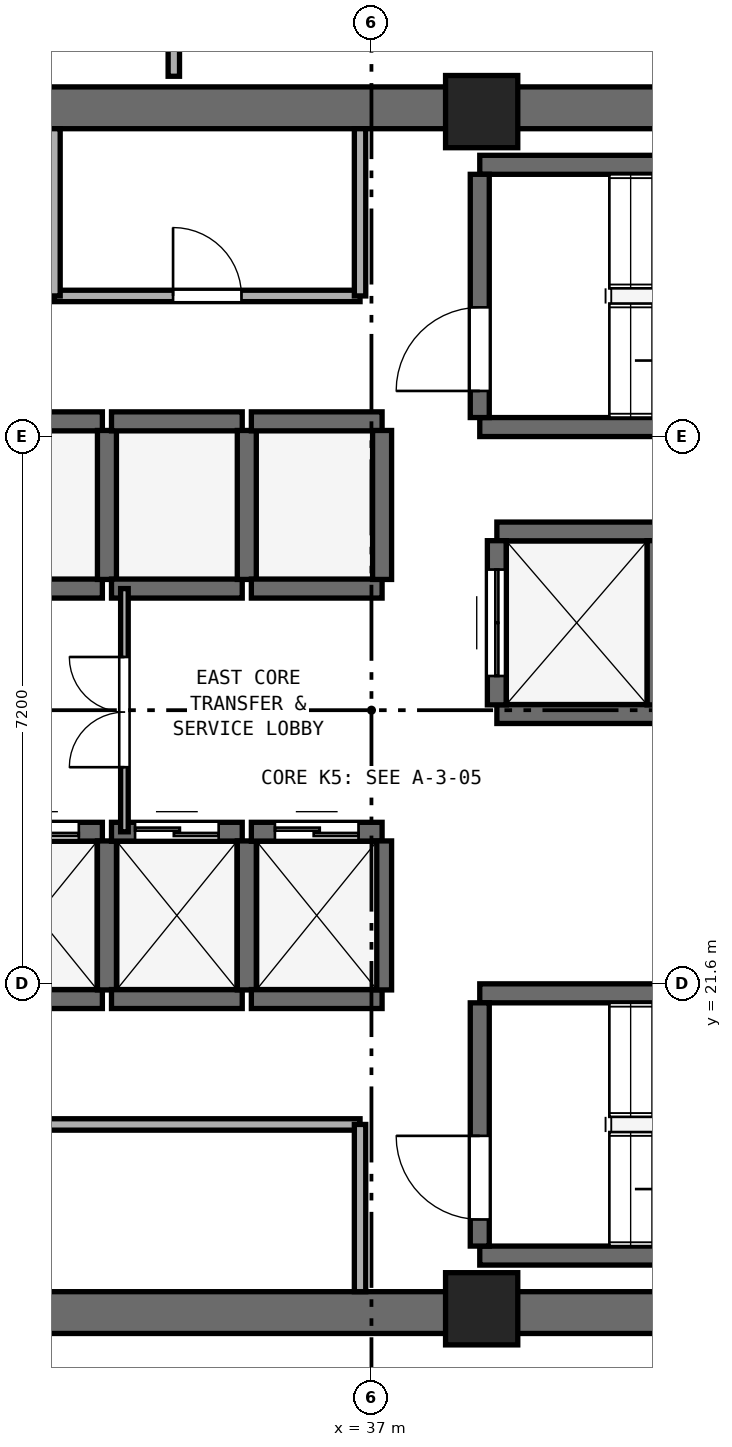
"""IFC4 building model, lengths in metres.
Left out: names, types, materials, properties, quantities, classifications, styles, units other than length and angle.
Written with IfcOpenShell. Run it as: python <this file> out.ifc"""

import sys

from ifc_helpers import new_model, si_unit, direction, frame, frame_2d, origin, origin_2d, place, context, subcontext, project, spatial, rectangle, extrude, element, fill, save


model = new_model("IFC4")
c1 = context("Model", 3, precision=1e-05, world=origin(), true_north=direction((0.0, 1.0)))
c2 = subcontext(c1, "Body", "Model", "MODEL_VIEW")
j1 = project(units=[si_unit("LENGTHUNIT", "METRE"), si_unit("PLANEANGLEUNIT", "RADIAN")], contexts=[c1])
p1 = place(None, origin())
s1 = spatial("IfcSite", under=j1, at=p1, CompositionType="ELEMENT")
p2 = place(p1, origin())
s2 = spatial("IfcBuilding", under=s1, at=p2, CompositionType="ELEMENT")
p3 = place(p2, frame((0.0, 0.0, 174.4)))
s3 = spatial("IfcBuildingStorey", under=s2, at=p3, CompositionType="ELEMENT", Elevation=174.4)
for number, where, z_axis, x_axis in (
    (1, (25.4, 17.275, 0.0), (0.0, 0.0, 1.0), (1.0, 0.0, 0.0)),
    (2, (25.4, 33.125, 0.0), (0.0, 0.0, 1.0), (1.0, 0.0, 0.0)),
):
    element("IfcWall", number, at=place(p3, frame(where, z_axis=z_axis, x_axis=x_axis)), inside=s3, PredefinedType="SHEAR", context=c2, shape_type="SweptSolid", body=[
        extrude(rectangle(XDim=23.2, YDim=0.55, at=frame_2d((11.6, 0.0))), origin(), (0.0, 0.0, 1.0), 3.54),
    ])
for number, where, z_axis, x_axis in (
    (3, (38.45, 17.325, 0.0), (0.0, 0.0, 1.0), (1.0, 0.0, 0.0)),
    (4, (38.45, 33.075, 0.0), (0.0, 0.0, 1.0), (1.0, 0.0, 0.0)),
):
    element("IfcColumn", number, at=place(p3, frame(where, z_axis=z_axis, x_axis=x_axis)), inside=s3, PredefinedType="PILASTER", context=c2, shape_type="SweptSolid", body=[
        extrude(rectangle(XDim=0.95, YDim=0.95, at=origin_2d()), origin(), (0.0, 0.0, 1.0), 3.8),
    ])
for number, where, z_axis, x_axis in (
    (5, (38.425, 28.925, 0.0), (0.0, 0.0, 1.0), (1.0, 0.0, 0.0)),
    (6, (38.425, 32.375, 0.0), (0.0, 0.0, 1.0), (1.0, 0.0, 0.0)),
):
    element("IfcWall", number, at=place(p3, frame(where, z_axis=z_axis, x_axis=x_axis)), inside=s3, PredefinedType="SHEAR", context=c2, shape_type="SweptSolid", body=[
        extrude(rectangle(XDim=7.3, YDim=0.25, at=frame_2d((3.65, 0.0))), origin(), (0.0, 0.0, 1.0), 3.54),
    ])
p4 = place(p3, frame((38.425, 29.05, 0.0), z_axis=(0.0, 0.0, 1.0), x_axis=(0.0, 1.0, 0.0)))
e7 = element("IfcWall", 7, at=p4, inside=s3, PredefinedType="SHEAR", context=c2, shape_type="SweptSolid", body=[
    extrude(rectangle(XDim=3.2, YDim=0.25, at=frame_2d((1.6, 0.0))), origin(), (0.0, 0.0, 1.0), 3.54),
])
p5 = place(p4, frame((0.35, 0.0, 0.0)))
e8 = element("IfcOpeningElement", 8, at=p5, cuts=e7, PredefinedType="OPENING", context=c2, shape_type="SweptSolid", body=[
    extrude(rectangle(XDim=1.1, YDim=2.15, at=frame_2d((0.55, 1.075))), frame((0.0, 0.135, 0.0), z_axis=(0.0, -1.0, 0.0), x_axis=(1.0, 0.0, 0.0)), (0.0, 0.0, 1.0), 0.27),
])
for number, where, z_axis, x_axis in (
    (9, (38.425, 18.025, 0.0), (0.0, 0.0, 1.0), (1.0, 0.0, 0.0)),
    (10, (38.425, 21.475, 0.0), (0.0, 0.0, 1.0), (1.0, 0.0, 0.0)),
):
    element("IfcWall", number, at=place(p3, frame(where, z_axis=z_axis, x_axis=x_axis)), inside=s3, PredefinedType="SHEAR", context=c2, shape_type="SweptSolid", body=[
        extrude(rectangle(XDim=7.3, YDim=0.25, at=frame_2d((3.65, 0.0))), origin(), (0.0, 0.0, 1.0), 3.54),
    ])
p6 = place(p3, frame((38.425, 18.15, 0.0), z_axis=(0.0, 0.0, 1.0), x_axis=(0.0, 1.0, 0.0)))
e11 = element("IfcWall", 11, at=p6, inside=s3, PredefinedType="SHEAR", context=c2, shape_type="SweptSolid", body=[
    extrude(rectangle(XDim=3.2, YDim=0.25, at=frame_2d((1.6, 0.0))), origin(), (0.0, 0.0, 1.0), 3.54),
])
p7 = place(p6, frame((0.35, 0.0, 0.0)))
e12 = element("IfcOpeningElement", 12, at=p7, cuts=e11, PredefinedType="OPENING", context=c2, shape_type="SweptSolid", body=[
    extrude(rectangle(XDim=1.1, YDim=2.15, at=frame_2d((0.55, 1.075))), frame((0.0, 0.135, 0.0), z_axis=(0.0, -1.0, 0.0), x_axis=(1.0, 0.0, 0.0)), (0.0, 0.0, 1.0), 0.27),
])
p8 = place(p3, frame((31.74, 21.4, 0.0), z_axis=(0.0, 0.0, 1.0), x_axis=(1.0, 0.0, 0.0)))
e13 = element("IfcWall", 13, at=p8, inside=s3, PredefinedType="SHEAR", context=c2, shape_type="SweptSolid", body=[
    extrude(rectangle(XDim=1.72, YDim=0.25, at=frame_2d((0.86, 0.0))), origin(), (0.0, 0.0, 1.0), 3.54),
])
p9 = place(p3, frame((31.74, 23.6, 0.0), z_axis=(0.0, 0.0, 1.0), x_axis=(1.0, 0.0, 0.0)))
e14 = element("IfcWall", 14, at=p9, inside=s3, PredefinedType="SHEAR", context=c2, shape_type="SweptSolid", body=[
    extrude(rectangle(XDim=1.72, YDim=0.25, at=frame_2d((0.86, 0.0))), origin(), (0.0, 0.0, 1.0), 3.54),
])
p10 = place(p9, frame((0.31, 0.0, 0.0)))
e15 = element("IfcOpeningElement", 15, at=p10, cuts=e14, PredefinedType="OPENING", context=c2, shape_type="SweptSolid", body=[
    extrude(rectangle(XDim=1.1, YDim=2.15, at=frame_2d((0.55, 1.075))), frame((0.0, 0.135, 0.0), z_axis=(0.0, -1.0, 0.0), x_axis=(1.0, 0.0, 0.0)), (0.0, 0.0, 1.0), 0.27),
])
p11 = place(p3, frame((33.52, 21.52, 0.0), z_axis=(0.0, 0.0, 1.0), x_axis=(0.0, 1.0, 0.0)))
e16 = element("IfcWall", 16, at=p11, inside=s3, PredefinedType="SHEAR", context=c2, shape_type="SweptSolid", body=[
    extrude(rectangle(XDim=1.96, YDim=0.25, at=frame_2d((0.98, 0.0))), origin(), (0.0, 0.0, 1.0), 3.54),
])
p12 = place(p3, frame((33.58, 21.4, 0.0), z_axis=(0.0, 0.0, 1.0), x_axis=(1.0, 0.0, 0.0)))
e17 = element("IfcWall", 17, at=p12, inside=s3, PredefinedType="SHEAR", context=c2, shape_type="SweptSolid", body=[
    extrude(rectangle(XDim=1.72, YDim=0.25, at=frame_2d((0.86, 0.0))), origin(), (0.0, 0.0, 1.0), 3.54),
])
p13 = place(p3, frame((33.58, 23.6, 0.0), z_axis=(0.0, 0.0, 1.0), x_axis=(1.0, 0.0, 0.0)))
e18 = element("IfcWall", 18, at=p13, inside=s3, PredefinedType="SHEAR", context=c2, shape_type="SweptSolid", body=[
    extrude(rectangle(XDim=1.72, YDim=0.25, at=frame_2d((0.86, 0.0))), origin(), (0.0, 0.0, 1.0), 3.54),
])
p14 = place(p13, frame((0.31, 0.0, 0.0)))
e19 = element("IfcOpeningElement", 19, at=p14, cuts=e18, PredefinedType="OPENING", context=c2, shape_type="SweptSolid", body=[
    extrude(rectangle(XDim=1.1, YDim=2.15, at=frame_2d((0.55, 1.075))), frame((0.0, 0.135, 0.0), z_axis=(0.0, -1.0, 0.0), x_axis=(1.0, 0.0, 0.0)), (0.0, 0.0, 1.0), 0.27),
])
p15 = place(p3, frame((35.36, 21.52, 0.0), z_axis=(0.0, 0.0, 1.0), x_axis=(0.0, 1.0, 0.0)))
e20 = element("IfcWall", 20, at=p15, inside=s3, PredefinedType="SHEAR", context=c2, shape_type="SweptSolid", body=[
    extrude(rectangle(XDim=1.96, YDim=0.25, at=frame_2d((0.98, 0.0))), origin(), (0.0, 0.0, 1.0), 3.54),
])
p16 = place(p3, frame((35.42, 21.4, 0.0), z_axis=(0.0, 0.0, 1.0), x_axis=(1.0, 0.0, 0.0)))
e21 = element("IfcWall", 21, at=p16, inside=s3, PredefinedType="SHEAR", context=c2, shape_type="SweptSolid", body=[
    extrude(rectangle(XDim=1.72, YDim=0.25, at=frame_2d((0.86, 0.0))), origin(), (0.0, 0.0, 1.0), 3.54),
])
p17 = place(p3, frame((35.42, 23.6, 0.0), z_axis=(0.0, 0.0, 1.0), x_axis=(1.0, 0.0, 0.0)))
e22 = element("IfcWall", 22, at=p17, inside=s3, PredefinedType="SHEAR", context=c2, shape_type="SweptSolid", body=[
    extrude(rectangle(XDim=1.72, YDim=0.25, at=frame_2d((0.86, 0.0))), origin(), (0.0, 0.0, 1.0), 3.54),
])
p18 = place(p17, frame((0.31, 0.0, 0.0)))
e23 = element("IfcOpeningElement", 23, at=p18, cuts=e22, PredefinedType="OPENING", context=c2, shape_type="SweptSolid", body=[
    extrude(rectangle(XDim=1.1, YDim=2.15, at=frame_2d((0.55, 1.075))), frame((0.0, 0.135, 0.0), z_axis=(0.0, -1.0, 0.0), x_axis=(1.0, 0.0, 0.0)), (0.0, 0.0, 1.0), 0.27),
])
p19 = place(p3, frame((37.14, 21.52, 0.0), z_axis=(0.0, 0.0, 1.0), x_axis=(0.0, 1.0, 0.0)))
e24 = element("IfcWall", 24, at=p19, inside=s3, PredefinedType="SHEAR", context=c2, shape_type="SweptSolid", body=[
    extrude(rectangle(XDim=1.96, YDim=0.25, at=frame_2d((0.98, 0.0))), origin(), (0.0, 0.0, 1.0), 3.54),
])
for number, where, z_axis, x_axis in (
    (25, (31.74, 26.8, 0.0), (0.0, 0.0, 1.0), (1.0, 0.0, 0.0)),
    (26, (31.74, 29.0, 0.0), (0.0, 0.0, 1.0), (1.0, 0.0, 0.0)),
):
    element("IfcWall", number, at=place(p3, frame(where, z_axis=z_axis, x_axis=x_axis)), inside=s3, PredefinedType="SHEAR", context=c2, shape_type="SweptSolid", body=[
        extrude(rectangle(XDim=1.72, YDim=0.25, at=frame_2d((0.86, 0.0))), origin(), (0.0, 0.0, 1.0), 3.54),
    ])
p20 = place(p3, frame((33.52, 26.92, 0.0), z_axis=(0.0, 0.0, 1.0), x_axis=(0.0, 1.0, 0.0)))
e27 = element("IfcWall", 27, at=p20, inside=s3, PredefinedType="SHEAR", context=c2, shape_type="SweptSolid", body=[
    extrude(rectangle(XDim=1.96, YDim=0.25, at=frame_2d((0.98, 0.0))), origin(), (0.0, 0.0, 1.0), 3.54),
])
for number, where, z_axis, x_axis in (
    (28, (33.58, 26.8, 0.0), (0.0, 0.0, 1.0), (1.0, 0.0, 0.0)),
    (29, (33.58, 29.0, 0.0), (0.0, 0.0, 1.0), (1.0, 0.0, 0.0)),
):
    element("IfcWall", number, at=place(p3, frame(where, z_axis=z_axis, x_axis=x_axis)), inside=s3, PredefinedType="SHEAR", context=c2, shape_type="SweptSolid", body=[
        extrude(rectangle(XDim=1.72, YDim=0.25, at=frame_2d((0.86, 0.0))), origin(), (0.0, 0.0, 1.0), 3.54),
    ])
p21 = place(p3, frame((35.36, 26.92, 0.0), z_axis=(0.0, 0.0, 1.0), x_axis=(0.0, 1.0, 0.0)))
e30 = element("IfcWall", 30, at=p21, inside=s3, PredefinedType="SHEAR", context=c2, shape_type="SweptSolid", body=[
    extrude(rectangle(XDim=1.96, YDim=0.25, at=frame_2d((0.98, 0.0))), origin(), (0.0, 0.0, 1.0), 3.54),
])
for number, where, z_axis, x_axis in (
    (31, (35.42, 26.8, 0.0), (0.0, 0.0, 1.0), (1.0, 0.0, 0.0)),
    (32, (35.42, 29.0, 0.0), (0.0, 0.0, 1.0), (1.0, 0.0, 0.0)),
):
    element("IfcWall", number, at=place(p3, frame(where, z_axis=z_axis, x_axis=x_axis)), inside=s3, PredefinedType="SHEAR", context=c2, shape_type="SweptSolid", body=[
        extrude(rectangle(XDim=1.72, YDim=0.25, at=frame_2d((0.86, 0.0))), origin(), (0.0, 0.0, 1.0), 3.54),
    ])
p22 = place(p3, frame((37.14, 26.92, 0.0), z_axis=(0.0, 0.0, 1.0), x_axis=(0.0, 1.0, 0.0)))
e33 = element("IfcWall", 33, at=p22, inside=s3, PredefinedType="SHEAR", context=c2, shape_type="SweptSolid", body=[
    extrude(rectangle(XDim=1.96, YDim=0.25, at=frame_2d((0.98, 0.0))), origin(), (0.0, 0.0, 1.0), 3.54),
])
for number, where, z_axis, x_axis in (
    (34, (38.65, 25.15, 0.0), (0.0, 0.0, 1.0), (1.0, 0.0, 0.0)),
    (35, (38.65, 27.55, 0.0), (0.0, 0.0, 1.0), (1.0, 0.0, 0.0)),
):
    element("IfcWall", number, at=place(p3, frame(where, z_axis=z_axis, x_axis=x_axis)), inside=s3, PredefinedType="SHEAR", context=c2, shape_type="SweptSolid", body=[
        extrude(rectangle(XDim=2.1, YDim=0.25, at=frame_2d((1.05, 0.0))), origin(), (0.0, 0.0, 1.0), 3.54),
    ])
p23 = place(p3, frame((38.65, 25.27, 0.0), z_axis=(0.0, 0.0, 1.0), x_axis=(0.0, 1.0, 0.0)))
e36 = element("IfcWall", 36, at=p23, inside=s3, PredefinedType="SHEAR", context=c2, shape_type="SweptSolid", body=[
    extrude(rectangle(XDim=2.16, YDim=0.25, at=frame_2d((1.08, 0.0))), origin(), (0.0, 0.0, 1.0), 3.54),
])
p24 = place(p23, frame((0.38, 0.0, 0.0)))
e37 = element("IfcOpeningElement", 37, at=p24, cuts=e36, PredefinedType="OPENING", context=c2, shape_type="SweptSolid", body=[
    extrude(rectangle(XDim=1.4, YDim=2.2, at=frame_2d((0.7, 1.1))), frame((0.0, 0.135, 0.0), z_axis=(0.0, -1.0, 0.0), x_axis=(1.0, 0.0, 0.0)), (0.0, 0.0, 1.0), 0.27),
])
p25 = place(p3, frame((40.75, 25.27, 0.0), z_axis=(0.0, 0.0, 1.0), x_axis=(0.0, 1.0, 0.0)))
e38 = element("IfcWall", 38, at=p25, inside=s3, PredefinedType="SHEAR", context=c2, shape_type="SweptSolid", body=[
    extrude(rectangle(XDim=2.16, YDim=0.25, at=frame_2d((1.08, 0.0))), origin(), (0.0, 0.0, 1.0), 3.54),
])
p26 = place(p3, frame((32.83, 30.65, 0.0), z_axis=(0.0, 0.0, 1.0), x_axis=(1.0, 0.0, 0.0)))
e39 = element("IfcWall", 39, at=p26, inside=s3, PredefinedType="PARTITIONING", context=c2, shape_type="SweptSolid", body=[
    extrude(rectangle(XDim=4.02, YDim=0.15, at=frame_2d((2.01, 0.0))), origin(), (0.0, 0.0, 1.0), 3.54),
])
p27 = place(p26, frame((1.56, 0.0, 0.0)))
e40 = element("IfcOpeningElement", 40, at=p27, cuts=e39, PredefinedType="OPENING", context=c2, shape_type="SweptSolid", body=[
    extrude(rectangle(XDim=0.9, YDim=2.1, at=frame_2d((0.45, 1.05))), frame((0.0, 0.085, 0.0), z_axis=(0.0, -1.0, 0.0), x_axis=(1.0, 0.0, 0.0)), (0.0, 0.0, 1.0), 0.17),
])
for number, where, z_axis, x_axis in (
    (41, (32.83, 30.65, 0.0), (0.0, 0.0, 1.0), (0.0, 1.0, 0.0)),
    (42, (36.85, 30.65, 0.0), (0.0, 0.0, 1.0), (0.0, 1.0, 0.0)),
):
    element("IfcWall", number, at=place(p3, frame(where, z_axis=z_axis, x_axis=x_axis)), inside=s3, PredefinedType="PARTITIONING", context=c2, shape_type="SweptSolid", body=[
        extrude(rectangle(XDim=2.2, YDim=0.15, at=frame_2d((1.1, 0.0))), origin(), (0.0, 0.0, 1.0), 3.54),
    ])
p28 = place(p3, frame((26.07, 19.75, 0.0), z_axis=(0.0, 0.0, 1.0), x_axis=(1.0, 0.0, 0.0)))
e43 = element("IfcWall", 43, at=p28, inside=s3, PredefinedType="PARTITIONING", context=c2, shape_type="SweptSolid", body=[
    extrude(rectangle(XDim=10.78, YDim=0.15, at=frame_2d((5.39, 0.0))), origin(), (0.0, 0.0, 1.0), 3.54),
])
p29 = place(p28, frame((4.915, 0.0, 0.0)))
e44 = element("IfcOpeningElement", 44, at=p29, cuts=e43, PredefinedType="OPENING", context=c2, shape_type="SweptSolid", body=[
    extrude(rectangle(XDim=0.95, YDim=2.1, at=frame_2d((0.475, 1.05))), frame((0.0, 0.085, 0.0), z_axis=(0.0, -1.0, 0.0), x_axis=(1.0, 0.0, 0.0)), (0.0, 0.0, 1.0), 0.17),
])
p30 = place(p3, frame((36.85, 17.55, 0.0), z_axis=(0.0, 0.0, 1.0), x_axis=(0.0, 1.0, 0.0)))
e45 = element("IfcWall", 45, at=p30, inside=s3, PredefinedType="PARTITIONING", context=c2, shape_type="SweptSolid", body=[
    extrude(rectangle(XDim=2.2, YDim=0.15, at=frame_2d((1.1, 0.0))), origin(), (0.0, 0.0, 1.0), 3.54),
])
p31 = place(p3, frame((33.75, 23.6, 0.0), z_axis=(0.0, 0.0, 1.0), x_axis=(0.0, 1.0, 0.0)))
e46 = element("IfcWall", 46, at=p31, inside=s3, PredefinedType="PARTITIONING", context=c2, shape_type="SweptSolid", body=[
    extrude(rectangle(XDim=3.2, YDim=0.1, at=frame_2d((1.6, 0.0))), origin(), (0.0, 0.0, 1.0), 3.54),
])
p32 = place(p31, frame((0.85, 0.0, 0.0)))
e47 = element("IfcOpeningElement", 47, at=p32, cuts=e46, PredefinedType="OPENING", context=c2, shape_type="SweptSolid", body=[
    extrude(rectangle(XDim=1.45, YDim=2.12, at=frame_2d((0.725, 1.06))), frame((0.0, 0.06, 0.0), z_axis=(0.0, -1.0, 0.0), x_axis=(1.0, 0.0, 0.0)), (0.0, 0.0, 1.0), 0.12),
])
p33 = place(p3, frame((34.4, 33.54, 0.0), z_axis=(0.0, 0.0, 1.0), x_axis=(0.0, 1.0, 0.0)))
e48 = element("IfcWall", 48, at=p33, inside=s3, PredefinedType="PARTITIONING", context=c2, shape_type="SweptSolid", body=[
    extrude(rectangle(XDim=2.41, YDim=0.15, at=frame_2d((1.205, 0.0))), origin(), (0.0, 0.0, 1.0), 3.54),
])
p34 = place(p5, origin())
e49 = element("IfcDoor", 49, at=p34, inside=s3, OperationType="SINGLE_SWING_LEFT", PredefinedType="DOOR", context=c2, shape_type="SweptSolid", body=[
    extrude(rectangle(XDim=1.1, YDim=2.15, at=frame_2d((0.55, 1.075))), frame((0.0, 0.025, 0.0), z_axis=(0.0, -1.0, 0.0), x_axis=(1.0, 0.0, 0.0)), (0.0, 0.0, 1.0), 0.05),
])
fill(e8, e49)
p35 = place(p7, origin())
e50 = element("IfcDoor", 50, at=p35, inside=s3, OperationType="SINGLE_SWING_RIGHT", PredefinedType="DOOR", context=c2, shape_type="SweptSolid", body=[
    extrude(rectangle(XDim=1.1, YDim=2.15, at=frame_2d((0.55, 1.075))), frame((0.0, 0.025, 0.0), z_axis=(0.0, -1.0, 0.0), x_axis=(1.0, 0.0, 0.0)), (0.0, 0.0, 1.0), 0.05),
])
fill(e12, e50)
p36 = place(p10, origin())
e51 = element("IfcDoor", 51, at=p36, inside=s3, OperationType="DOUBLE_DOOR_SLIDING", PredefinedType="DOOR", context=c2, shape_type="SweptSolid", body=[
    extrude(rectangle(XDim=1.1, YDim=2.15, at=frame_2d((0.55, 1.075))), frame((0.0, 0.025, 0.0), z_axis=(0.0, -1.0, 0.0), x_axis=(1.0, 0.0, 0.0)), (0.0, 0.0, 1.0), 0.05),
])
fill(e15, e51)
p37 = place(p14, origin())
e52 = element("IfcDoor", 52, at=p37, inside=s3, OperationType="DOUBLE_DOOR_SLIDING", PredefinedType="DOOR", context=c2, shape_type="SweptSolid", body=[
    extrude(rectangle(XDim=1.1, YDim=2.15, at=frame_2d((0.55, 1.075))), frame((0.0, 0.025, 0.0), z_axis=(0.0, -1.0, 0.0), x_axis=(1.0, 0.0, 0.0)), (0.0, 0.0, 1.0), 0.05),
])
fill(e19, e52)
p38 = place(p18, origin())
e53 = element("IfcDoor", 53, at=p38, inside=s3, OperationType="DOUBLE_DOOR_SLIDING", PredefinedType="DOOR", context=c2, shape_type="SweptSolid", body=[
    extrude(rectangle(XDim=1.1, YDim=2.15, at=frame_2d((0.55, 1.075))), frame((0.0, 0.025, 0.0), z_axis=(0.0, -1.0, 0.0), x_axis=(1.0, 0.0, 0.0)), (0.0, 0.0, 1.0), 0.05),
])
fill(e23, e53)
p39 = place(p24, origin())
e54 = element("IfcDoor", 54, at=p39, inside=s3, OperationType="DOUBLE_DOOR_SLIDING", PredefinedType="DOOR", context=c2, shape_type="SweptSolid", body=[
    extrude(rectangle(XDim=1.4, YDim=2.2, at=frame_2d((0.7, 1.1))), frame((0.0, 0.025, 0.0), z_axis=(0.0, -1.0, 0.0), x_axis=(1.0, 0.0, 0.0)), (0.0, 0.0, 1.0), 0.05),
])
fill(e37, e54)
p40 = place(p27, origin())
e55 = element("IfcDoor", 55, at=p40, inside=s3, OperationType="SINGLE_SWING_LEFT", PredefinedType="DOOR", context=c2, shape_type="SweptSolid", body=[
    extrude(rectangle(XDim=0.9, YDim=2.1, at=frame_2d((0.45, 1.05))), frame((0.0, 0.025, 0.0), z_axis=(0.0, -1.0, 0.0), x_axis=(1.0, 0.0, 0.0)), (0.0, 0.0, 1.0), 0.05),
])
fill(e40, e55)
p41 = place(p32, origin())
e56 = element("IfcDoor", 56, at=p41, inside=s3, OperationType="DOUBLE_DOOR_SINGLE_SWING", PredefinedType="DOOR", context=c2, shape_type="SweptSolid", body=[
    extrude(rectangle(XDim=1.45, YDim=2.12, at=frame_2d((0.725, 1.06))), frame((0.0, 0.025, 0.0), z_axis=(0.0, -1.0, 0.0), x_axis=(1.0, 0.0, 0.0)), (0.0, 0.0, 1.0), 0.05),
])
fill(e47, e56)
save(model, sys.argv[1])
